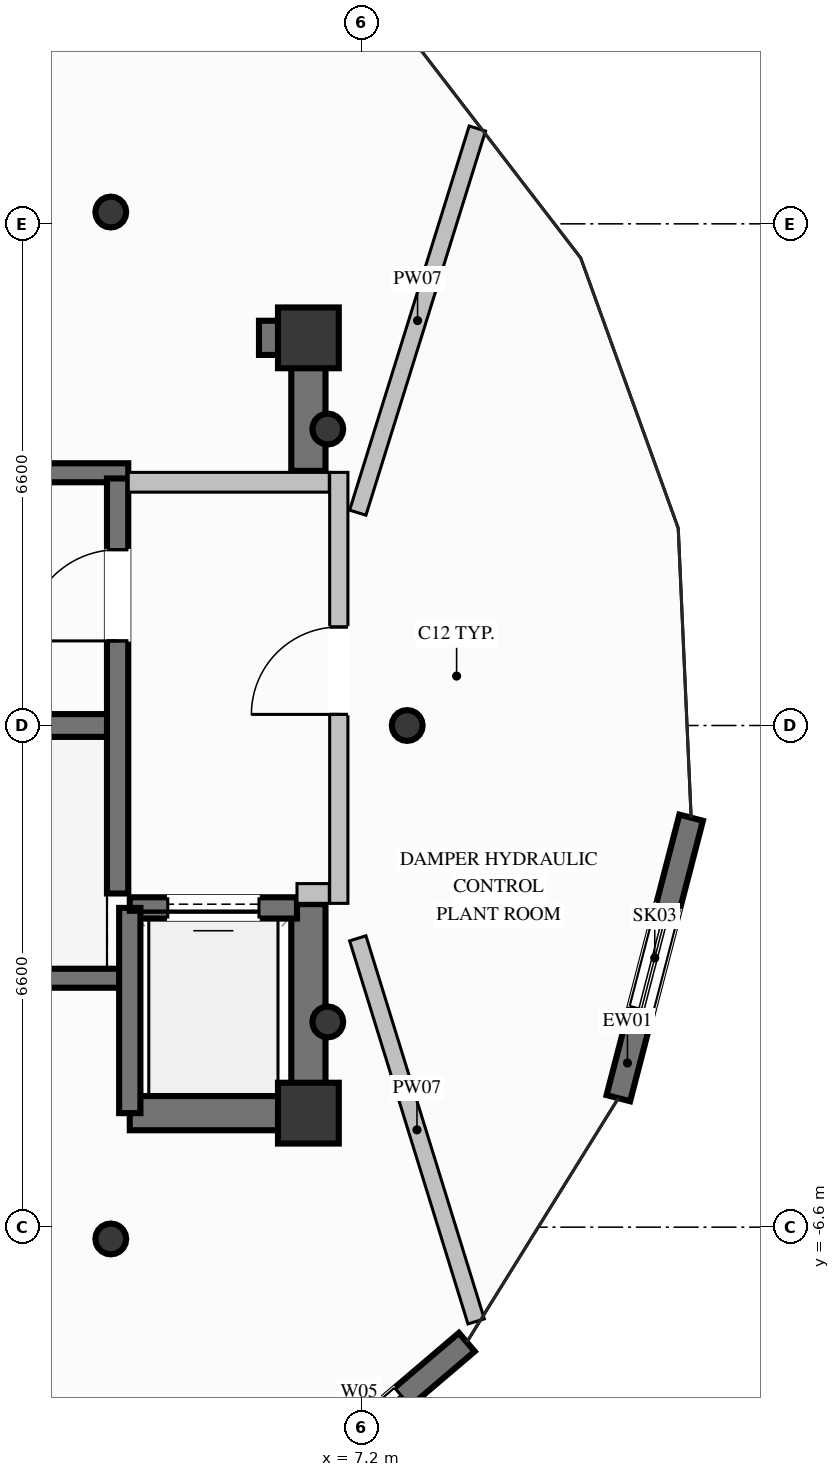
"""IFC4 building model, lengths in metres.
Left out: names, types, materials, properties, quantities, classifications, styles, units other than length and angle.
Written with IfcOpenShell. Run it as: python <this file> out.ifc"""

import sys

from ifc_helpers import new_model, si_unit, direction, frame, frame_2d, origin, origin_2d, place, context, subcontext, project, spatial, rectangle, hollow_circle, extrude, element, fill, save


model = new_model("IFC4")
c1 = context("Model", 3, precision=1e-05, world=origin(), true_north=direction((0.0, 1.0)))
c2 = subcontext(c1, "Body", "Model", "MODEL_VIEW")
j1 = project(units=[si_unit("LENGTHUNIT", "METRE"), si_unit("PLANEANGLEUNIT", "RADIAN")], contexts=[c1])
p1 = place(None, origin())
s1 = spatial("IfcSite", under=j1, at=p1, CompositionType="ELEMENT")
p2 = place(p1, origin())
s2 = spatial("IfcBuilding", under=s1, at=p2, CompositionType="ELEMENT")
p3 = place(p2, frame((0.0, 0.0, 314.6)))
s3 = spatial("IfcBuildingStorey", under=s2, at=p3, CompositionType="ELEMENT", Elevation=314.6)
for number, where, z_axis, x_axis in (
    (1, (6.5, -5.1, 0.0), (0.0, 0.0, 1.0), (1.0, 0.0, 0.0)),
    (2, (6.5, 5.1, 0.0), (0.0, 0.0, 1.0), (1.0, 0.0, 0.0)),
):
    element("IfcColumn", number, at=place(p3, frame(where, z_axis=z_axis, x_axis=x_axis)), inside=s3, PredefinedType="COLUMN", context=c2, shape_type="SweptSolid", body=[
        extrude(rectangle(XDim=0.8, YDim=0.8, at=origin_2d()), origin(), (0.0, 0.0, 1.0), 6.4),
    ])
p4 = place(p3, frame((-3.99, 0.0, 0.0), z_axis=(0.0, 0.0, 1.0), x_axis=(1.0, 0.0, 0.0)))
e3 = element("IfcWall", 3, at=p4, inside=s3, PredefinedType="SHEAR", context=c2, shape_type="SweptSolid", body=[
    extrude(rectangle(XDim=7.98, YDim=0.3, at=frame_2d((3.99, 0.0))), origin(), (0.0, 0.0, 1.0), 6.4),
])
for number, where, z_axis, x_axis in (
    (4, (-4.13, -3.325, 0.0), (0.0, 0.0, 1.0), (1.0, 0.0, 0.0)),
    (5, (-4.13, 3.325, 0.0), (0.0, 0.0, 1.0), (1.0, 0.0, 0.0)),
):
    element("IfcWall", number, at=place(p3, frame(where, z_axis=z_axis, x_axis=x_axis)), inside=s3, PredefinedType="SOLIDWALL", context=c2, shape_type="SweptSolid", body=[
        extrude(rectangle(XDim=8.26, YDim=0.25, at=frame_2d((4.13, 0.0))), origin(), (0.0, 0.0, 1.0), 6.4),
    ])
p5 = place(p3, frame((4.15, -5.1, 0.0), z_axis=(0.0, 0.0, 1.0), x_axis=(1.0, 0.0, 0.0)))
e6 = element("IfcWall", 6, at=p5, inside=s3, PredefinedType="SHEAR", context=c2, shape_type="SweptSolid", body=[
    extrude(rectangle(XDim=2.125, YDim=0.45, at=frame_2d((1.062, 0.0))), origin(), (0.0, 0.0, 1.0), 6.4),
])
p6 = place(p3, frame((5.85, 5.1, 0.0), z_axis=(0.0, 0.0, 1.0), x_axis=(1.0, 0.0, 0.0)))
e7 = element("IfcWall", 7, at=p6, inside=s3, PredefinedType="SHEAR", context=c2, shape_type="SweptSolid", body=[
    extrude(rectangle(XDim=0.425, YDim=0.45, at=frame_2d((0.212, 0.0))), origin(), (0.0, 0.0, 1.0), 6.4),
])
p7 = place(p3, frame((6.5, -5.325, 0.0), z_axis=(0.0, 0.0, 1.0), x_axis=(0.0, 1.0, 0.0)))
e8 = element("IfcWall", 8, at=p7, inside=s3, PredefinedType="SHEAR", context=c2, shape_type="SweptSolid", body=[
    extrude(rectangle(XDim=2.975, YDim=0.45, at=frame_2d((1.487, 0.0))), origin(), (0.0, 0.0, 1.0), 6.4),
])
p8 = place(p3, frame((6.5, 3.35, 0.0), z_axis=(0.0, 0.0, 1.0), x_axis=(0.0, 1.0, 0.0)))
e9 = element("IfcWall", 9, at=p8, inside=s3, PredefinedType="SHEAR", context=c2, shape_type="SweptSolid", body=[
    extrude(rectangle(XDim=1.975, YDim=0.45, at=frame_2d((0.987, 0.0))), origin(), (0.0, 0.0, 1.0), 6.4),
])
for number, where, z_axis, x_axis in (
    (10, (7.8, 0.0, 0.0), (0.0, 0.0, 1.0), (1.0, 0.0, 0.0)),
    (11, (6.755, 3.9, 0.0), (0.0, 0.0, 1.0), (1.0, 0.0, 0.0)),
    (12, (3.9, 6.755, 0.0), (0.0, 0.0, 1.0), (1.0, 0.0, 0.0)),
    (13, (3.9, -6.755, 0.0), (0.0, 0.0, 1.0), (1.0, 0.0, 0.0)),
    (14, (6.755, -3.9, 0.0), (0.0, 0.0, 1.0), (1.0, 0.0, 0.0)),
):
    element("IfcColumn", number, at=place(p3, frame(where, z_axis=z_axis, x_axis=x_axis)), inside=s3, PredefinedType="COLUMN", context=c2, shape_type="SweptSolid", body=[
        extrude(hollow_circle(Radius=0.203, WallThickness=0.016, at=origin_2d()), origin(), (0.0, 0.0, 1.0), 6.4),
    ])
p9 = place(p3, frame((8.584, -8.113, 0.0), z_axis=(0.0, 0.0, 1.0), x_axis=(-0.761104204201, -0.648629624938, 0.0)))
e15 = element("IfcWall", 15, at=p9, inside=s3, PredefinedType="SOLIDWALL", context=c2, shape_type="SweptSolid", body=[
    extrude(rectangle(XDim=3.725, YDim=0.32, at=frame_2d((1.862, 0.0))), origin(), (0.0, 0.0, 1.0), 6.12),
])
p10 = place(p9, frame((1.112, 0.0, 1.1)))
e16 = element("IfcOpeningElement", 16, at=p10, cuts=e15, PredefinedType="OPENING", context=c2, shape_type="SweptSolid", body=[
    extrude(rectangle(XDim=1.5, YDim=1.2, at=frame_2d((0.75, 0.6))), frame((0.0, 0.17, 0.0), z_axis=(0.0, -1.0, 0.0), x_axis=(1.0, 0.0, 0.0)), (0.0, 0.0, 1.0), 0.34),
])
p11 = place(p3, frame((11.536, -1.213, 0.0), z_axis=(0.0, 0.0, 1.0), x_axis=(-0.2512799417, -0.967914454329, 0.0)))
e17 = element("IfcWall", 17, at=p11, inside=s3, PredefinedType="SOLIDWALL", context=c2, shape_type="SweptSolid", body=[
    extrude(rectangle(XDim=3.812, YDim=0.32, at=frame_2d((1.906, 0.0))), origin(), (0.0, 0.0, 1.0), 6.12),
])
p12 = place(p11, frame((1.206, 0.0, 0.6)))
e18 = element("IfcOpeningElement", 18, at=p12, cuts=e17, PredefinedType="OPENING", context=c2, shape_type="SweptSolid", body=[
    extrude(rectangle(XDim=1.4, YDim=1.8, at=frame_2d((0.7, 0.9))), frame((0.0, 0.17, 0.0), z_axis=(0.0, -1.0, 0.0), x_axis=(1.0, 0.0, 0.0)), (0.0, 0.0, 1.0), 0.34),
])
p13 = place(p3, frame((6.35, -2.4, 0.0), z_axis=(0.0, 0.0, 1.0), x_axis=(-1.0, 0.0, 0.0)))
e19 = element("IfcWall", 19, at=p13, inside=s3, PredefinedType="SOLIDWALL", context=c2, shape_type="SweptSolid", body=[
    extrude(rectangle(XDim=2.2, YDim=0.28, at=frame_2d((1.1, 0.0))), origin(), (0.0, 0.0, 1.0), 6.12),
])
p14 = place(p13, frame((0.5, 0.0, 0.0)))
e20 = element("IfcOpeningElement", 20, at=p14, cuts=e19, PredefinedType="OPENING", context=c2, shape_type="SweptSolid", body=[
    extrude(rectangle(XDim=1.2, YDim=2.2, at=frame_2d((0.6, 1.1))), frame((0.0, 0.15, 0.0), z_axis=(0.0, -1.0, 0.0), x_axis=(1.0, 0.0, 0.0)), (0.0, 0.0, 1.0), 0.3),
])
p15 = place(p3, frame((4.15, -2.4, 0.0), z_axis=(0.0, 0.0, 1.0), x_axis=(0.0, -1.0, 0.0)))
e21 = element("IfcWall", 21, at=p15, inside=s3, PredefinedType="SOLIDWALL", context=c2, shape_type="SweptSolid", body=[
    extrude(rectangle(XDim=2.7, YDim=0.28, at=frame_2d((1.35, 0.0))), origin(), (0.0, 0.0, 1.0), 6.12),
])
p16 = place(p3, frame((3.99, -2.21, 0.0), z_axis=(0.0, 0.0, 1.0), x_axis=(0.0, 1.0, 0.0)))
e22 = element("IfcWall", 22, at=p16, inside=s3, PredefinedType="SOLIDWALL", context=c2, shape_type="SweptSolid", body=[
    extrude(rectangle(XDim=5.46, YDim=0.28, at=frame_2d((2.73, 0.0))), origin(), (0.0, 0.0, 1.0), 6.12),
])
p17 = place(p16, frame((3.323, 0.0, 0.0)))
e23 = element("IfcOpeningElement", 23, at=p17, cuts=e22, PredefinedType="OPENING", context=c2, shape_type="SweptSolid", body=[
    extrude(rectangle(XDim=1.2, YDim=2.2, at=frame_2d((0.6, 1.1))), frame((0.0, 0.15, 0.0), z_axis=(0.0, -1.0, 0.0), x_axis=(1.0, 0.0, 0.0)), (0.0, 0.0, 1.0), 0.3),
])
p18 = place(p3, frame((6.9, -2.34, 0.0), z_axis=(0.0, 0.0, 1.0), x_axis=(0.0, 1.0, 0.0)))
e24 = element("IfcWall", 24, at=p18, inside=s3, PredefinedType="PARTITIONING", context=c2, shape_type="SweptSolid", body=[
    extrude(rectangle(XDim=5.67, YDim=0.24, at=frame_2d((2.835, 0.0))), origin(), (0.0, 0.0, 1.0), 5.005),
])
p19 = place(p18, frame((2.486, 0.0, 0.0)))
e25 = element("IfcOpeningElement", 25, at=p19, cuts=e24, PredefinedType="OPENING", context=c2, shape_type="SweptSolid", body=[
    extrude(rectangle(XDim=1.15, YDim=2.2, at=frame_2d((0.575, 1.1))), frame((0.0, 0.13, 0.0), z_axis=(0.0, -1.0, 0.0), x_axis=(1.0, 0.0, 0.0)), (0.0, 0.0, 1.0), 0.26),
])
p20 = place(p3, frame((6.35, -2.21, 0.0), z_axis=(0.0, 0.0, 1.0), x_axis=(1.0, 0.0, 0.0)))
e26 = element("IfcWall", 26, at=p20, inside=s3, PredefinedType="PARTITIONING", context=c2, shape_type="SweptSolid", body=[
    extrude(rectangle(XDim=0.425, YDim=0.26, at=frame_2d((0.212, 0.0))), origin(), (0.0, 0.0, 1.0), 6.12),
])
p21 = place(p3, frame((4.13, 3.2, 0.0), z_axis=(0.0, 0.0, 1.0), x_axis=(1.0, 0.0, 0.0)))
e27 = element("IfcWall", 27, at=p21, inside=s3, PredefinedType="PARTITIONING", context=c2, shape_type="SweptSolid", body=[
    extrude(rectangle(XDim=2.645, YDim=0.26, at=frame_2d((1.323, 0.0))), origin(), (0.0, 0.0, 1.0), 6.12),
])
p22 = place(p3, frame((7.15, 2.8, 0.0), z_axis=(0.0, 0.0, 1.0), x_axis=(0.297179629103, 0.954821589642, 0.0)))
e28 = element("IfcWall", 28, at=p22, inside=s3, PredefinedType="PARTITIONING", context=c2, shape_type="SweptSolid", body=[
    extrude(rectangle(XDim=5.293, YDim=0.225, at=frame_2d((2.646, 0.0))), origin(), (0.0, 0.0, 1.0), 5.005),
])
p23 = place(p3, frame((7.15, -2.8, 0.0), z_axis=(0.0, 0.0, 1.0), x_axis=(0.295184908093, -0.955440144663, 0.0)))
e29 = element("IfcWall", 29, at=p23, inside=s3, PredefinedType="PARTITIONING", context=c2, shape_type="SweptSolid", body=[
    extrude(rectangle(XDim=5.275, YDim=0.225, at=frame_2d((2.638, 0.0))), origin(), (0.0, 0.0, 1.0), 5.005),
])
p24 = place(p10, origin())
e30 = element("IfcWindow", 30, at=p24, inside=s3, PartitioningType="SINGLE_PANEL", PredefinedType="WINDOW", context=c2, shape_type="SweptSolid", body=[
    extrude(rectangle(XDim=1.5, YDim=1.2, at=frame_2d((0.75, 0.6))), frame((0.0, 0.03, 0.0), z_axis=(0.0, -1.0, 0.0), x_axis=(1.0, 0.0, 0.0)), (0.0, 0.0, 1.0), 0.06),
])
fill(e16, e30)
p25 = place(p12, origin())
e31 = element("IfcWindow", 31, at=p25, inside=s3, PartitioningType="SINGLE_PANEL", PredefinedType="SKYLIGHT", context=c2, shape_type="SweptSolid", body=[
    extrude(rectangle(XDim=1.4, YDim=1.8, at=frame_2d((0.7, 0.9))), frame((0.0, 0.03, 0.0), z_axis=(0.0, -1.0, 0.0), x_axis=(1.0, 0.0, 0.0)), (0.0, 0.0, 1.0), 0.06),
])
fill(e18, e31)
p26 = place(p14, origin())
e32 = element("IfcDoor", 32, at=p26, inside=s3, OperationType="SLIDING_TO_LEFT", PredefinedType="DOOR", context=c2, shape_type="SweptSolid", body=[
    extrude(rectangle(XDim=1.2, YDim=2.2, at=frame_2d((0.6, 1.1))), frame((0.0, 0.025, 0.0), z_axis=(0.0, -1.0, 0.0), x_axis=(1.0, 0.0, 0.0)), (0.0, 0.0, 1.0), 0.05),
])
fill(e20, e32)
p27 = place(p17, origin())
e33 = element("IfcDoor", 33, at=p27, inside=s3, OperationType="SINGLE_SWING_LEFT", PredefinedType="DOOR", context=c2, shape_type="SweptSolid", body=[
    extrude(rectangle(XDim=1.2, YDim=2.2, at=frame_2d((0.6, 1.1))), frame((0.0, 0.025, 0.0), z_axis=(0.0, -1.0, 0.0), x_axis=(1.0, 0.0, 0.0)), (0.0, 0.0, 1.0), 0.05),
])
fill(e23, e33)
p28 = place(p19, origin())
e34 = element("IfcDoor", 34, at=p28, inside=s3, OperationType="SINGLE_SWING_LEFT", PredefinedType="DOOR", context=c2, shape_type="SweptSolid", body=[
    extrude(rectangle(XDim=1.15, YDim=2.2, at=frame_2d((0.575, 1.1))), frame((0.0, 0.025, 0.0), z_axis=(0.0, -1.0, 0.0), x_axis=(1.0, 0.0, 0.0)), (0.0, 0.0, 1.0), 0.05),
])
fill(e25, e34)
save(model, sys.argv[1])
